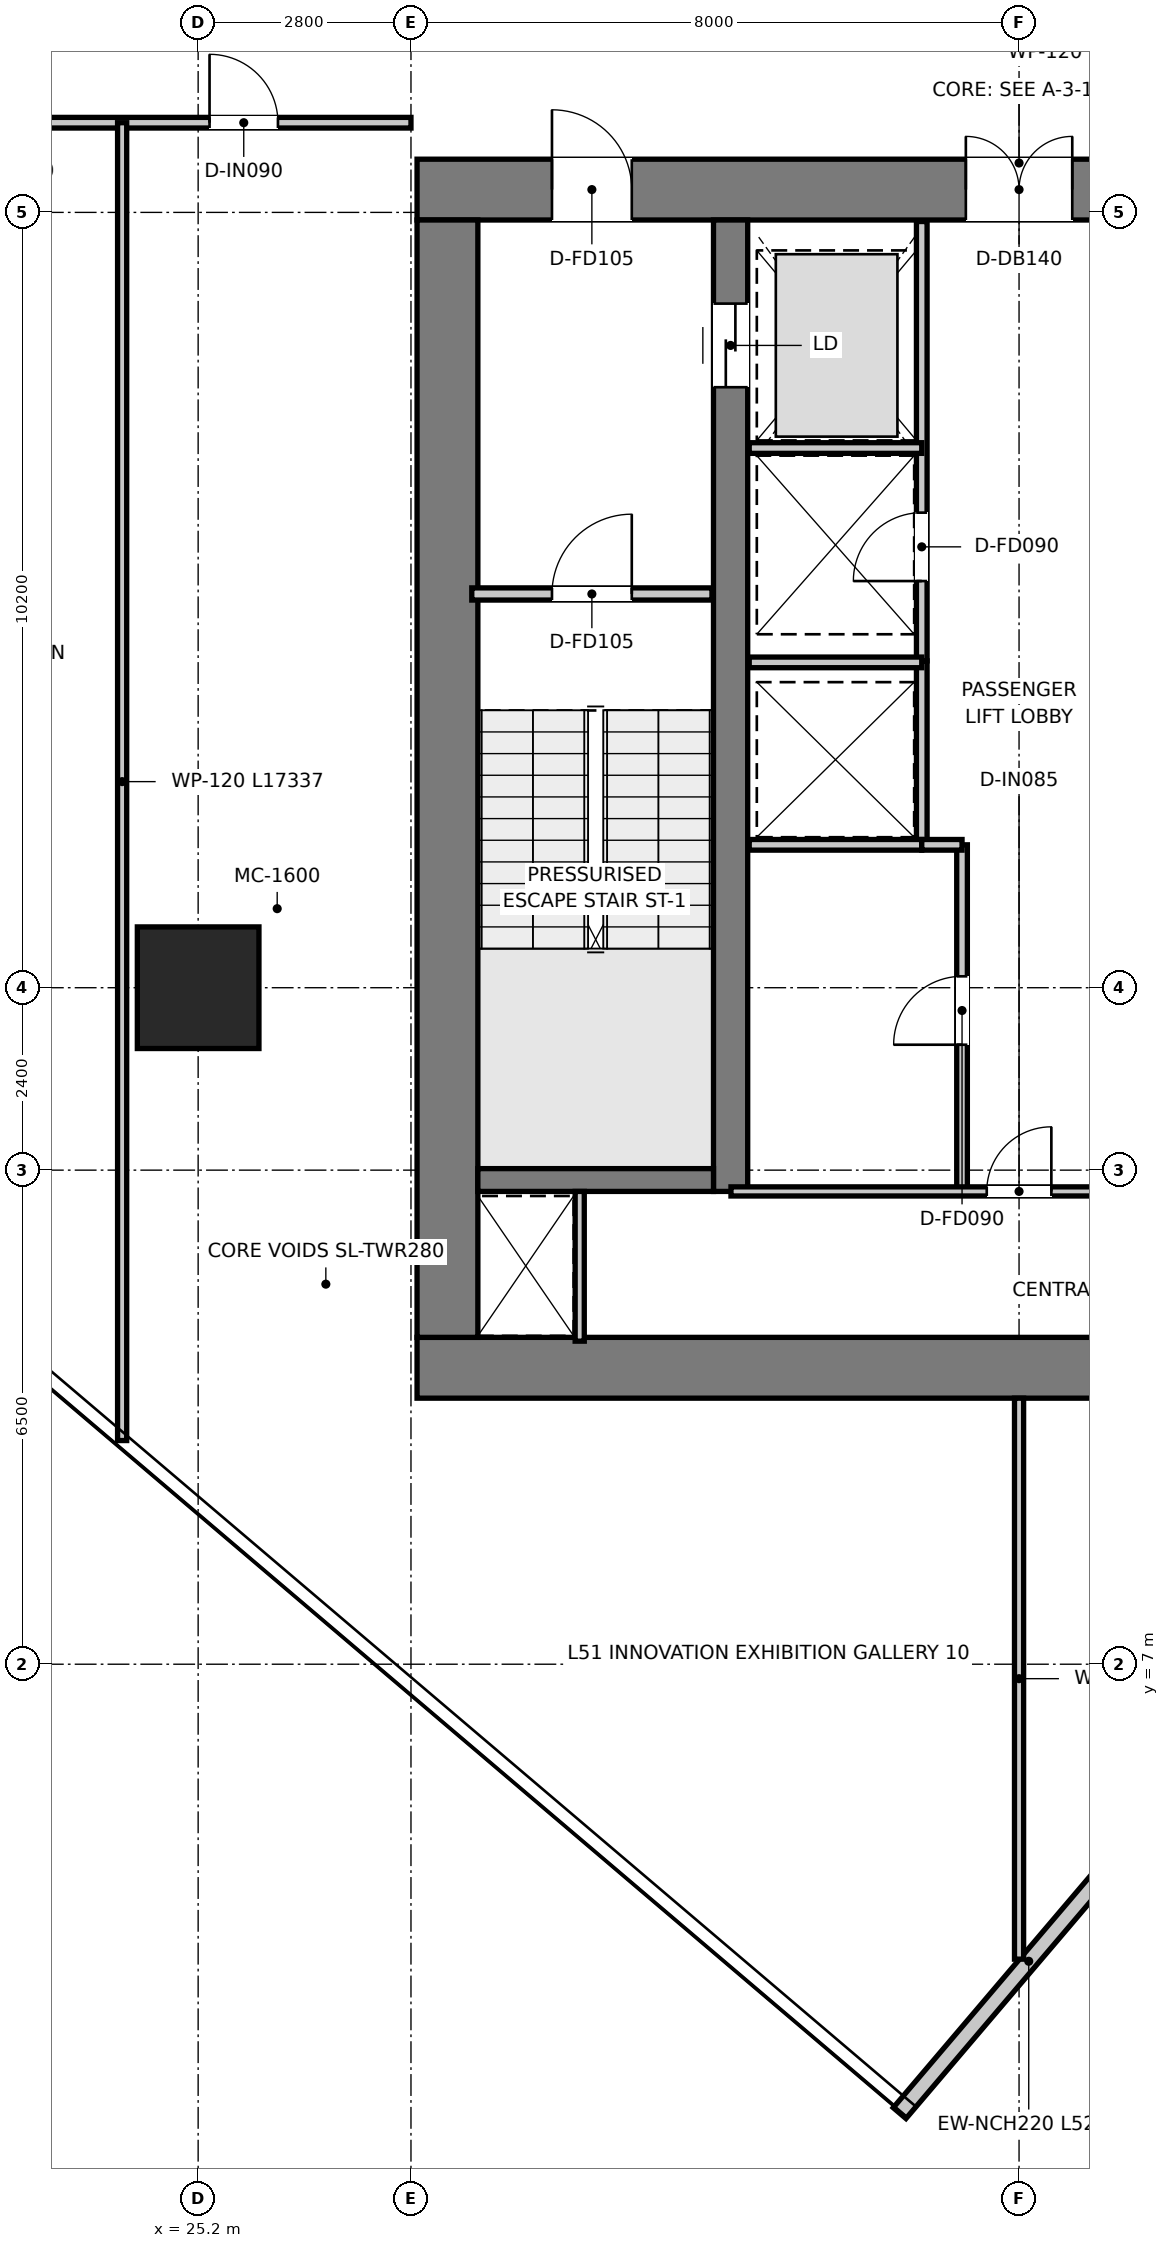
"""IFC4 building model, lengths in metres.
Left out: names, types, materials, properties, quantities, classifications, styles, units other than length and angle.
Written with IfcOpenShell. Run it as: python <this file> out.ifc"""

import sys

from ifc_helpers import new_model, si_unit, direction, frame, frame_2d, origin, origin_2d, place, context, subcontext, project, spatial, rectangle, extrude, source, transform, mapped, element, fill, save


model = new_model("IFC4")
c1 = context("Model", 3, precision=1e-05, world=origin(), true_north=direction((0.0, 1.0)))
c2 = subcontext(c1, "Body", "Model", "MODEL_VIEW")
j1 = project(units=[si_unit("LENGTHUNIT", "METRE"), si_unit("PLANEANGLEUNIT", "RADIAN")], contexts=[c1])
p1 = place(None, origin())
s1 = spatial("IfcSite", under=j1, at=p1, CompositionType="ELEMENT")
p2 = place(p1, origin())
s2 = spatial("IfcBuilding", under=s1, at=p2, CompositionType="ELEMENT")
p3 = place(p2, frame((0.0, 0.0, 211.25)))
s3 = spatial("IfcBuildingStorey", under=s2, at=p3, CompositionType="ELEMENT", Elevation=211.25)
p4 = place(p3, frame((28.08, 10.9, 0.0), z_axis=(0.0, 0.0, 1.0), x_axis=(1.0, 0.0, 0.0)))
e1 = element("IfcWall", 1, at=p4, inside=s3, PredefinedType="SHEAR", context=c2, shape_type="SweptSolid", body=[
    extrude(rectangle(XDim=15.84, YDim=0.8, at=frame_2d((7.92, 0.0))), origin(), (0.0, 0.0, 1.0), 3.95),
])
p5 = place(p3, frame((28.08, 26.4, 0.0), z_axis=(0.0, 0.0, 1.0), x_axis=(1.0, 0.0, 0.0)))
e2 = element("IfcWall", 2, at=p5, inside=s3, PredefinedType="SHEAR", context=c2, shape_type="SweptSolid", body=[
    extrude(rectangle(XDim=15.84, YDim=0.8, at=frame_2d((7.92, 0.0))), origin(), (0.0, 0.0, 1.0), 3.95),
])
p6 = place(p5, frame((7.22, 0.0, 0.0)))
e3 = element("IfcOpeningElement", 3, at=p6, cuts=e2, PredefinedType="OPENING", context=c2, shape_type="SweptSolid", body=[
    extrude(rectangle(XDim=1.4, YDim=2.2, at=frame_2d((0.7, 1.1))), frame((0.0, 0.41, 0.0), z_axis=(0.0, -1.0, 0.0), x_axis=(1.0, 0.0, 0.0)), (0.0, 0.0, 1.0), 0.82),
])
p7 = place(p5, frame((1.775, 0.0, 0.0)))
e4 = element("IfcOpeningElement", 4, at=p7, cuts=e2, PredefinedType="OPENING", context=c2, shape_type="SweptSolid", body=[
    extrude(rectangle(XDim=1.05, YDim=2.1, at=frame_2d((0.525, 1.05))), frame((0.0, 0.41, 0.0), z_axis=(0.0, -1.0, 0.0), x_axis=(1.0, 0.0, 0.0)), (0.0, 0.0, 1.0), 0.82),
])
p8 = place(p5, frame((13.015, 0.0, 0.0)))
e5 = element("IfcOpeningElement", 5, at=p8, cuts=e2, PredefinedType="OPENING", context=c2, shape_type="SweptSolid", body=[
    extrude(rectangle(XDim=1.05, YDim=2.1, at=frame_2d((0.525, 1.05))), frame((0.0, 0.41, 0.0), z_axis=(0.0, -1.0, 0.0), x_axis=(1.0, 0.0, 0.0)), (0.0, 0.0, 1.0), 0.82),
])
p9 = place(p3, frame((28.48, 11.3, 0.0), z_axis=(0.0, 0.0, 1.0), x_axis=(0.0, 1.0, 0.0)))
e6 = element("IfcWall", 6, at=p9, inside=s3, PredefinedType="SHEAR", context=c2, shape_type="SweptSolid", body=[
    extrude(rectangle(XDim=14.7, YDim=0.8, at=frame_2d((7.35, 0.0))), origin(), (0.0, 0.0, 1.0), 3.95),
])
p10 = place(p3, frame((32.205, 13.22, 0.0), z_axis=(0.0, 0.0, 1.0), x_axis=(0.0, 1.0, 0.0)))
e7 = element("IfcWall", 7, at=p10, inside=s3, PredefinedType="SHEAR", context=c2, shape_type="SweptSolid", body=[
    extrude(rectangle(XDim=12.78, YDim=0.45, at=frame_2d((6.39, 0.0))), origin(), (0.0, 0.0, 1.0), 3.95),
])
p11 = place(p10, frame((10.58, 0.0, 0.0)))
e8 = element("IfcOpeningElement", 8, at=p11, cuts=e7, PredefinedType="OPENING", context=c2, shape_type="SweptSolid", body=[
    extrude(rectangle(XDim=1.1, YDim=2.15, at=frame_2d((0.55, 1.075))), frame((0.0, 0.235, 0.0), z_axis=(0.0, -1.0, 0.0), x_axis=(1.0, 0.0, 0.0)), (0.0, 0.0, 1.0), 0.47),
])
p12 = place(p3, frame((28.88, 13.37, 0.0), z_axis=(0.0, 0.0, 1.0), x_axis=(1.0, 0.0, 0.0)))
e9 = element("IfcWall", 9, at=p12, inside=s3, PredefinedType="SHEAR", context=c2, shape_type="SweptSolid", body=[
    extrude(rectangle(XDim=3.1, YDim=0.3, at=frame_2d((1.55, 0.0))), origin(), (0.0, 0.0, 1.0), 3.95),
])
m1 = source(origin(), c2, "Body", "SweptSolid", [
    extrude(rectangle(XDim=1.6, YDim=1.6, at=origin_2d()), origin(), (0.0, 0.0, 1.0), 3.95),
])
p13 = place(p3, frame((25.2, 15.9, 0.0), z_axis=(0.0, 0.0, 1.0), x_axis=(1.0, 0.0, 0.0)))
e10 = element("IfcColumn", 10, at=p13, inside=s3, PredefinedType="USERDEFINED", context=c2, shape_type="MappedRepresentation", body=[
    mapped(m1, transform((0.0, 0.0, 0.0), x_axis=(1.0, 0.0, 0.0), y_axis=(0.0, 1.0, 0.0), z_axis=(0.0, 0.0, 1.0), scale=1.0)),
])
p14 = place(p3, frame((34.428, 1.094, 0.0), z_axis=(0.0, 0.0, 1.0), x_axis=(0.647807844474, 0.761803778304, 0.0)))
e11 = element("IfcWall", 11, at=p14, inside=s3, PredefinedType="ELEMENTEDWALL", context=c2, shape_type="SweptSolid", body=[
    extrude(rectangle(XDim=5.245, YDim=0.22, at=frame_2d((2.623, 0.0))), origin(), (0.0, 0.0, 1.0), 3.67),
])
p15 = place(p3, frame((28.8, 21.08, 0.0), z_axis=(0.0, 0.0, 1.0), x_axis=(1.0, 0.0, 0.0)))
e12 = element("IfcWall", 12, at=p15, inside=s3, PredefinedType="PARTITIONING", context=c2, shape_type="SweptSolid", body=[
    extrude(rectangle(XDim=3.16, YDim=0.16, at=frame_2d((1.58, 0.0))), origin(), (0.0, 0.0, 1.0), 3.67),
])
p16 = place(p15, frame((1.055, 0.0, 0.0)))
e13 = element("IfcOpeningElement", 13, at=p16, cuts=e12, PredefinedType="OPENING", context=c2, shape_type="SweptSolid", body=[
    extrude(rectangle(XDim=1.05, YDim=2.1, at=frame_2d((0.525, 1.05))), frame((0.0, 0.09, 0.0), z_axis=(0.0, -1.0, 0.0), x_axis=(1.0, 0.0, 0.0)), (0.0, 0.0, 1.0), 0.18),
])
p17 = place(p3, frame((34.72, 20.2, 0.0), z_axis=(0.0, 0.0, 1.0), x_axis=(0.0, 1.0, 0.0)))
e14 = element("IfcWall", 14, at=p17, inside=s3, PredefinedType="PARTITIONING", context=c2, shape_type="SweptSolid", body=[
    extrude(rectangle(XDim=5.78, YDim=0.14, at=frame_2d((2.89, 0.0))), origin(), (0.0, 0.0, 1.0), 2.67),
])
p18 = place(p17, frame((1.05, 0.0, 0.0)))
e15 = element("IfcOpeningElement", 15, at=p18, cuts=e14, PredefinedType="OPENING", context=c2, shape_type="SweptSolid", body=[
    extrude(rectangle(XDim=0.9, YDim=2.1, at=frame_2d((0.45, 1.05))), frame((0.0, 0.08, 0.0), z_axis=(0.0, -1.0, 0.0), x_axis=(1.0, 0.0, 0.0)), (0.0, 0.0, 1.0), 0.16),
])
p19 = place(p3, frame((32.45, 23.0, 0.0), z_axis=(0.0, 0.0, 1.0), x_axis=(1.0, 0.0, 0.0)))
e16 = element("IfcWall", 16, at=p19, inside=s3, PredefinedType="PARTITIONING", context=c2, shape_type="SweptSolid", body=[
    extrude(rectangle(XDim=2.27, YDim=0.14, at=frame_2d((1.135, 0.0))), origin(), (0.0, 0.0, 1.0), 2.67),
])
p20 = place(p3, frame((34.72, 17.78, 0.0), z_axis=(0.0, 0.0, 1.0), x_axis=(0.0, 1.0, 0.0)))
e17 = element("IfcWall", 17, at=p20, inside=s3, PredefinedType="PARTITIONING", context=c2, shape_type="SweptSolid", body=[
    extrude(rectangle(XDim=2.42, YDim=0.14, at=frame_2d((1.21, 0.0))), origin(), (0.0, 0.0, 1.0), 3.67),
])
for number, where, z_axis, x_axis in (
    (18, (32.45, 17.78, 0.0), (0.0, 0.0, 1.0), (1.0, 0.0, 0.0)),
    (19, (32.45, 20.18, 0.0), (0.0, 0.0, 1.0), (1.0, 0.0, 0.0)),
):
    element("IfcWall", number, at=place(p3, frame(where, z_axis=z_axis, x_axis=x_axis)), inside=s3, PredefinedType="PARTITIONING", context=c2, shape_type="SweptSolid", body=[
        extrude(rectangle(XDim=2.27, YDim=0.14, at=frame_2d((1.135, 0.0))), origin(), (0.0, 0.0, 1.0), 3.67),
    ])
p21 = place(p3, frame((35.25, 13.22, 0.0), z_axis=(0.0, 0.0, 1.0), x_axis=(0.0, 1.0, 0.0)))
e20 = element("IfcWall", 20, at=p21, inside=s3, PredefinedType="PARTITIONING", context=c2, shape_type="SweptSolid", body=[
    extrude(rectangle(XDim=4.56, YDim=0.14, at=frame_2d((2.28, 0.0))), origin(), (0.0, 0.0, 1.0), 3.67),
])
p22 = place(p21, frame((1.93, 0.0, 0.0)))
e21 = element("IfcOpeningElement", 21, at=p22, cuts=e20, PredefinedType="OPENING", context=c2, shape_type="SweptSolid", body=[
    extrude(rectangle(XDim=0.9, YDim=2.1, at=frame_2d((0.45, 1.05))), frame((0.0, 0.08, 0.0), z_axis=(0.0, -1.0, 0.0), x_axis=(1.0, 0.0, 0.0)), (0.0, 0.0, 1.0), 0.16),
])
p23 = place(p3, frame((34.72, 17.78, 0.0), z_axis=(0.0, 0.0, 1.0), x_axis=(1.0, 0.0, 0.0)))
e22 = element("IfcWall", 22, at=p23, inside=s3, PredefinedType="PARTITIONING", context=c2, shape_type="SweptSolid", body=[
    extrude(rectangle(XDim=0.53, YDim=0.14, at=frame_2d((0.265, 0.0))), origin(), (0.0, 0.0, 1.0), 3.67),
])
p24 = place(p3, frame((30.22, 11.25, 0.0), z_axis=(0.0, 0.0, 1.0), x_axis=(0.0, 1.0, 0.0)))
e23 = element("IfcWall", 23, at=p24, inside=s3, PredefinedType="PARTITIONING", context=c2, shape_type="SweptSolid", body=[
    extrude(rectangle(XDim=1.97, YDim=0.12, at=frame_2d((0.985, 0.0))), origin(), (0.0, 0.0, 1.0), 3.67),
])
p25 = place(p3, frame((32.21, 13.22, 0.0), z_axis=(0.0, 0.0, 1.0), x_axis=(1.0, 0.0, 0.0)))
e24 = element("IfcWall", 24, at=p25, inside=s3, PredefinedType="PARTITIONING", context=c2, shape_type="SweptSolid", body=[
    extrude(rectangle(XDim=7.58, YDim=0.12, at=frame_2d((3.79, 0.0))), origin(), (0.0, 0.0, 1.0), 3.67),
])
p26 = place(p25, frame((3.365, 0.0, 0.0)))
e25 = element("IfcOpeningElement", 25, at=p26, cuts=e24, PredefinedType="OPENING", context=c2, shape_type="SweptSolid", body=[
    extrude(rectangle(XDim=0.85, YDim=2.1, at=frame_2d((0.425, 1.05))), frame((0.0, 0.07, 0.0), z_axis=(0.0, -1.0, 0.0), x_axis=(1.0, 0.0, 0.0)), (0.0, 0.0, 1.0), 0.14),
])
p27 = place(p3, frame((11.738, 27.28, 0.0), z_axis=(0.0, 0.0, 1.0), x_axis=(1.0, 0.0, 0.0)))
e26 = element("IfcWall", 26, at=p27, inside=s3, PredefinedType="PARTITIONING", context=c2, shape_type="SweptSolid", body=[
    extrude(rectangle(XDim=16.262, YDim=0.14, at=frame_2d((8.131, 0.0))), origin(), (0.0, 0.0, 1.0), 3.03),
])
p28 = place(p27, frame((3.038, 0.0, 0.0)))
e27 = element("IfcOpeningElement", 27, at=p28, cuts=e26, PredefinedType="OPENING", context=c2, shape_type="SweptSolid", body=[
    extrude(rectangle(XDim=0.9, YDim=2.1, at=frame_2d((0.45, 1.05))), frame((0.0, 0.08, 0.0), z_axis=(0.0, -1.0, 0.0), x_axis=(1.0, 0.0, 0.0)), (0.0, 0.0, 1.0), 0.16),
])
p29 = place(p27, frame((10.612, 0.0, 0.0)))
e28 = element("IfcOpeningElement", 28, at=p29, cuts=e26, PredefinedType="OPENING", context=c2, shape_type="SweptSolid", body=[
    extrude(rectangle(XDim=0.9, YDim=2.1, at=frame_2d((0.45, 1.05))), frame((0.0, 0.08, 0.0), z_axis=(0.0, -1.0, 0.0), x_axis=(1.0, 0.0, 0.0)), (0.0, 0.0, 1.0), 0.16),
])
p30 = place(p27, frame((13.612, 0.0, 0.0)))
e29 = element("IfcOpeningElement", 29, at=p30, cuts=e26, PredefinedType="OPENING", context=c2, shape_type="SweptSolid", body=[
    extrude(rectangle(XDim=0.9, YDim=2.1, at=frame_2d((0.45, 1.05))), frame((0.0, 0.08, 0.0), z_axis=(0.0, -1.0, 0.0), x_axis=(1.0, 0.0, 0.0)), (0.0, 0.0, 1.0), 0.16),
])
p31 = place(p3, frame((36.0, 3.12, 0.0), z_axis=(0.0, 0.0, 1.0), x_axis=(0.0, 1.0, 0.0)))
e30 = element("IfcWall", 30, at=p31, inside=s3, PredefinedType="PARTITIONING", context=c2, shape_type="SweptSolid", body=[
    extrude(rectangle(XDim=7.38, YDim=0.12, at=frame_2d((3.69, 0.0))), origin(), (0.0, 0.0, 1.0), 3.67),
])
p32 = place(p3, frame((24.2, 9.943, 0.0), z_axis=(0.0, 0.0, 1.0), x_axis=(0.0, 1.0, 0.0)))
e31 = element("IfcWall", 31, at=p32, inside=s3, PredefinedType="PARTITIONING", context=c2, shape_type="SweptSolid", body=[
    extrude(rectangle(XDim=17.337, YDim=0.12, at=frame_2d((8.669, 0.0))), origin(), (0.0, 0.0, 1.0), 3.18),
])
p33 = place(p16, origin())
e32 = element("IfcDoor", 32, at=p33, inside=s3, OperationType="SINGLE_SWING_RIGHT", PredefinedType="DOOR", context=c2, shape_type="SweptSolid", body=[
    extrude(rectangle(XDim=1.05, YDim=2.1, at=frame_2d((0.525, 1.05))), frame((0.0, 0.025, 0.0), z_axis=(0.0, -1.0, 0.0), x_axis=(1.0, 0.0, 0.0)), (0.0, 0.0, 1.0), 0.05),
])
fill(e13, e32)
p34 = place(p6, origin())
e33 = element("IfcDoor", 33, at=p34, inside=s3, OperationType="DOUBLE_DOOR_SINGLE_SWING", PredefinedType="DOOR", context=c2, shape_type="SweptSolid", body=[
    extrude(rectangle(XDim=1.4, YDim=2.2, at=frame_2d((0.7, 1.1))), frame((0.0, 0.025, 0.0), z_axis=(0.0, -1.0, 0.0), x_axis=(1.0, 0.0, 0.0)), (0.0, 0.0, 1.0), 0.05),
])
fill(e3, e33)
p35 = place(p7, origin())
e34 = element("IfcDoor", 34, at=p35, inside=s3, OperationType="SINGLE_SWING_LEFT", PredefinedType="DOOR", context=c2, shape_type="SweptSolid", body=[
    extrude(rectangle(XDim=1.05, YDim=2.1, at=frame_2d((0.525, 1.05))), frame((0.0, 0.025, 0.0), z_axis=(0.0, -1.0, 0.0), x_axis=(1.0, 0.0, 0.0)), (0.0, 0.0, 1.0), 0.05),
])
fill(e4, e34)
p36 = place(p11, origin())
e35 = element("IfcDoor", 35, at=p36, inside=s3, OperationType="DOUBLE_DOOR_SLIDING", PredefinedType="DOOR", context=c2, shape_type="SweptSolid", body=[
    extrude(rectangle(XDim=1.1, YDim=2.15, at=frame_2d((0.55, 1.075))), frame((0.0, 0.025, 0.0), z_axis=(0.0, -1.0, 0.0), x_axis=(1.0, 0.0, 0.0)), (0.0, 0.0, 1.0), 0.05),
])
fill(e8, e35)
p37 = place(p18, origin())
e36 = element("IfcDoor", 36, at=p37, inside=s3, OperationType="SINGLE_SWING_LEFT", PredefinedType="DOOR", context=c2, shape_type="SweptSolid", body=[
    extrude(rectangle(XDim=0.9, YDim=2.1, at=frame_2d((0.45, 1.05))), frame((0.0, 0.025, 0.0), z_axis=(0.0, -1.0, 0.0), x_axis=(1.0, 0.0, 0.0)), (0.0, 0.0, 1.0), 0.05),
])
fill(e15, e36)
p38 = place(p22, origin())
e37 = element("IfcDoor", 37, at=p38, inside=s3, OperationType="SINGLE_SWING_LEFT", PredefinedType="DOOR", context=c2, shape_type="SweptSolid", body=[
    extrude(rectangle(XDim=0.9, YDim=2.1, at=frame_2d((0.45, 1.05))), frame((0.0, 0.025, 0.0), z_axis=(0.0, -1.0, 0.0), x_axis=(1.0, 0.0, 0.0)), (0.0, 0.0, 1.0), 0.05),
])
fill(e21, e37)
p39 = place(p26, origin())
e38 = element("IfcDoor", 38, at=p39, inside=s3, OperationType="SINGLE_SWING_RIGHT", PredefinedType="DOOR", context=c2, shape_type="SweptSolid", body=[
    extrude(rectangle(XDim=0.85, YDim=2.1, at=frame_2d((0.425, 1.05))), frame((0.0, 0.025, 0.0), z_axis=(0.0, -1.0, 0.0), x_axis=(1.0, 0.0, 0.0)), (0.0, 0.0, 1.0), 0.05),
])
fill(e25, e38)
p40 = place(p30, origin())
e39 = element("IfcDoor", 39, at=p40, inside=s3, OperationType="SINGLE_SWING_LEFT", PredefinedType="DOOR", context=c2, shape_type="SweptSolid", body=[
    extrude(rectangle(XDim=0.9, YDim=2.1, at=frame_2d((0.45, 1.05))), frame((0.0, 0.025, 0.0), z_axis=(0.0, -1.0, 0.0), x_axis=(1.0, 0.0, 0.0)), (0.0, 0.0, 1.0), 0.05),
])
fill(e29, e39)
save(model, sys.argv[1])
